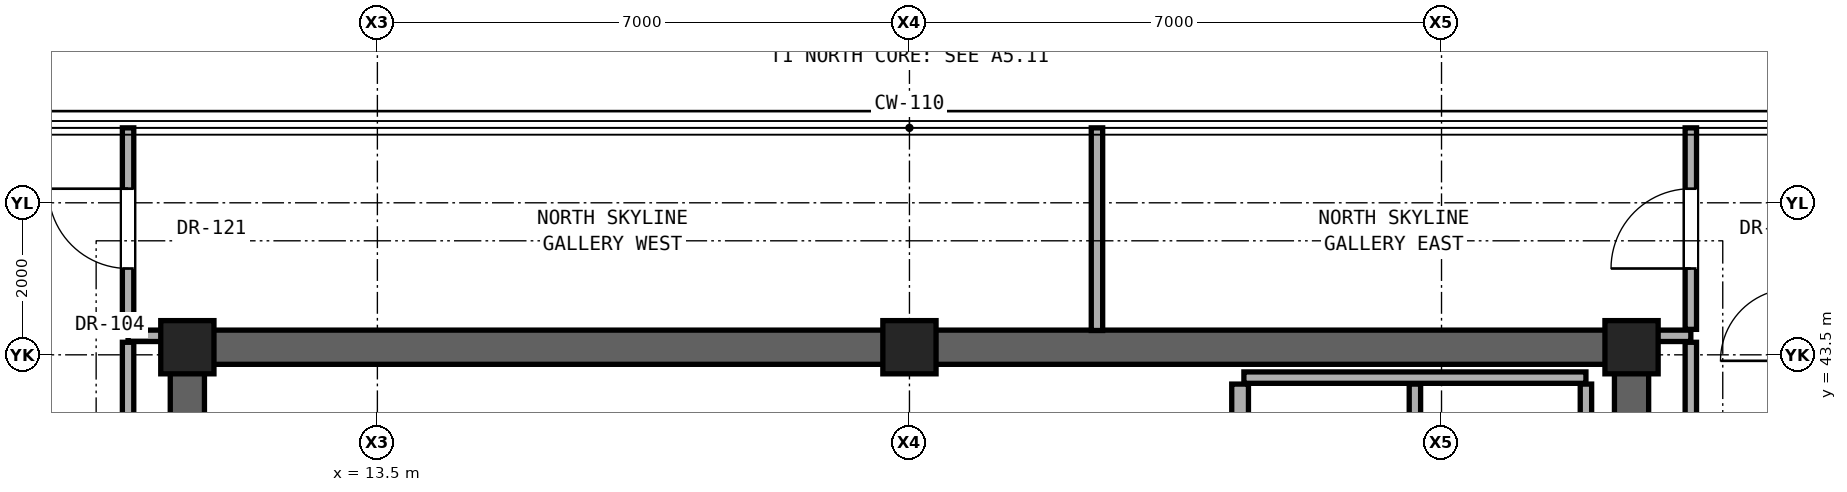
"""IFC4 building model, lengths in metres.
Left out: names, types, materials, properties, quantities, classifications, styles, units other than length and angle.
Written with IfcOpenShell. Run it as: python <this file> out.ifc"""

import sys

from ifc_helpers import new_model, si_unit, direction, frame, frame_2d, origin, origin_2d, place, context, subcontext, project, spatial, rectangle, extrude, element, fill, save


model = new_model("IFC4")
c1 = context("Model", 3, precision=1e-05, world=origin(), true_north=direction((0.0, 1.0)))
c2 = subcontext(c1, "Body", "Model", "MODEL_VIEW")
j1 = project(units=[si_unit("LENGTHUNIT", "METRE"), si_unit("PLANEANGLEUNIT", "RADIAN")], contexts=[c1])
p1 = place(None, origin())
s1 = spatial("IfcSite", under=j1, at=p1, CompositionType="ELEMENT")
p2 = place(p1, origin())
s2 = spatial("IfcBuilding", under=s1, at=p2, CompositionType="ELEMENT")
p3 = place(p2, frame((0.0, 0.0, 256.3)))
s3 = spatial("IfcBuildingStorey", under=s2, at=p3, CompositionType="ELEMENT", Elevation=256.3)
for number, where, z_axis, x_axis in (
    (1, (11.0, 43.6, 0.0), (0.0, 0.0, 1.0), (1.0, 0.0, 0.0)),
    (2, (20.5, 43.6, 0.0), (0.0, 0.0, 1.0), (1.0, 0.0, 0.0)),
    (3, (30.0, 43.6, 0.0), (0.0, 0.0, 1.0), (1.0, 0.0, 0.0)),
):
    element("IfcColumn", number, at=place(p3, frame(where, z_axis=z_axis, x_axis=x_axis)), inside=s3, PredefinedType="COLUMN", context=c2, shape_type="SweptSolid", body=[
        extrude(rectangle(XDim=0.7, YDim=0.7, at=origin_2d()), origin(), (0.0, 0.0, 1.0), 3.6),
    ])
p4 = place(p3, frame((11.0, 43.6, 0.0), z_axis=(0.0, 0.0, 1.0), x_axis=(1.0, 0.0, 0.0)))
e4 = element("IfcWall", 4, at=p4, inside=s3, PredefinedType="SHEAR", context=c2, shape_type="SweptSolid", body=[
    extrude(rectangle(XDim=19.0, YDim=0.45, at=frame_2d((9.5, 0.0))), origin(), (0.0, 0.0, 1.0), 3.4),
])
for number, where, z_axis, x_axis in (
    (5, (11.0, 37.6, 0.0), (0.0, 0.0, 1.0), (0.0, 1.0, 0.0)),
    (6, (30.0, 37.6, 0.0), (0.0, 0.0, 1.0), (0.0, 1.0, 0.0)),
):
    element("IfcWall", number, at=place(p3, frame(where, z_axis=z_axis, x_axis=x_axis)), inside=s3, PredefinedType="SHEAR", context=c2, shape_type="SweptSolid", body=[
        extrude(rectangle(XDim=6.0, YDim=0.45, at=frame_2d((3.0, 0.0))), origin(), (0.0, 0.0, 1.0), 3.4),
    ])
p5 = place(p3, frame((24.9, 43.2, 0.0), z_axis=(0.0, 0.0, 1.0), x_axis=(1.0, 0.0, 0.0)))
e7 = element("IfcWall", 7, at=p5, inside=s3, PredefinedType="PARTITIONING", context=c2, shape_type="SweptSolid", body=[
    extrude(rectangle(XDim=4.5, YDim=0.15, at=frame_2d((2.25, 0.0))), origin(), (0.0, 0.0, 1.0), 3.4),
])
for number, where, z_axis, x_axis in (
    (8, (10.22, 43.75, 0.0), (0.0, 0.0, 1.0), (1.0, 0.0, 0.0)),
    (9, (30.22, 43.75, 0.0), (0.0, 0.0, 1.0), (1.0, 0.0, 0.0)),
):
    element("IfcWall", number, at=place(p3, frame(where, z_axis=z_axis, x_axis=x_axis)), inside=s3, PredefinedType="PARTITIONING", context=c2, shape_type="SweptSolid", body=[
        extrude(rectangle(XDim=0.56, YDim=0.15, at=frame_2d((0.28, 0.0))), origin(), (0.0, 0.0, 1.0), 3.4),
    ])
p6 = place(p3, frame((10.22, 34.535, 0.0), z_axis=(0.0, 0.0, 1.0), x_axis=(0.0, 1.0, 0.0)))
e10 = element("IfcWall", 10, at=p6, inside=s3, PredefinedType="PARTITIONING", context=c2, shape_type="SweptSolid", body=[
    extrude(rectangle(XDim=9.13, YDim=0.15, at=frame_2d((4.565, 0.0))), origin(), (0.0, 0.0, 1.0), 2.792),
])
p7 = place(p3, frame((10.22, 43.835, 0.0), z_axis=(0.0, 0.0, 1.0), x_axis=(0.0, 1.0, 0.0)))
e11 = element("IfcWall", 11, at=p7, inside=s3, PredefinedType="PARTITIONING", context=c2, shape_type="SweptSolid", body=[
    extrude(rectangle(XDim=2.651, YDim=0.15, at=frame_2d((1.326, 0.0))), origin(), (0.0, 0.0, 1.0), 3.4),
])
p8 = place(p7, frame((0.801, 0.0, 0.0)))
e12 = element("IfcOpeningElement", 12, at=p8, cuts=e11, PredefinedType="OPENING", context=c2, shape_type="SweptSolid", body=[
    extrude(rectangle(XDim=1.05, YDim=2.2, at=frame_2d((0.525, 1.1))), frame((0.0, 0.085, 0.0), z_axis=(0.0, -1.0, 0.0), x_axis=(1.0, 0.0, 0.0)), (0.0, 0.0, 1.0), 0.17),
])
p9 = place(p3, frame((22.967, 43.82, 0.0), z_axis=(0.0, 0.0, 1.0), x_axis=(0.0, 1.0, 0.0)))
e13 = element("IfcWall", 13, at=p9, inside=s3, PredefinedType="PARTITIONING", context=c2, shape_type="SweptSolid", body=[
    extrude(rectangle(XDim=2.666, YDim=0.15, at=frame_2d((1.333, 0.0))), origin(), (0.0, 0.0, 1.0), 3.4),
])
p10 = place(p3, frame((24.85, 40.26, 0.0), z_axis=(0.0, 0.0, 1.0), x_axis=(0.0, 1.0, 0.0)))
e14 = element("IfcWall", 14, at=p10, inside=s3, PredefinedType="SOLIDWALL", context=c2, shape_type="SweptSolid", body=[
    extrude(rectangle(XDim=2.855, YDim=0.22, at=frame_2d((1.427, 0.0))), origin(), (0.0, 0.0, 1.0), 3.4),
])
for number, where, z_axis, x_axis in (
    (15, (27.15, 37.82, 0.0), (0.0, 0.0, 1.0), (0.0, 1.0, 0.0)),
    (16, (29.4, 37.82, 0.0), (0.0, 0.0, 1.0), (0.0, 1.0, 0.0)),
):
    element("IfcWall", number, at=place(p3, frame(where, z_axis=z_axis, x_axis=x_axis)), inside=s3, PredefinedType="PARTITIONING", context=c2, shape_type="SweptSolid", body=[
        extrude(rectangle(XDim=5.295, YDim=0.15, at=frame_2d((2.647, 0.0))), origin(), (0.0, 0.0, 1.0), 3.4),
    ])
p11 = place(p3, frame((30.78, 34.57, 0.0), z_axis=(0.0, 0.0, 1.0), x_axis=(0.0, 1.0, 0.0)))
e17 = element("IfcWall", 17, at=p11, inside=s3, PredefinedType="PARTITIONING", context=c2, shape_type="SweptSolid", body=[
    extrude(rectangle(XDim=9.095, YDim=0.15, at=frame_2d((4.547, 0.0))), origin(), (0.0, 0.0, 1.0), 2.792),
])
p12 = place(p3, frame((30.78, 43.835, 0.0), z_axis=(0.0, 0.0, 1.0), x_axis=(0.0, 1.0, 0.0)))
e18 = element("IfcWall", 18, at=p12, inside=s3, PredefinedType="PARTITIONING", context=c2, shape_type="SweptSolid", body=[
    extrude(rectangle(XDim=2.651, YDim=0.15, at=frame_2d((1.326, 0.0))), origin(), (0.0, 0.0, 1.0), 3.4),
])
p13 = place(p12, frame((0.801, 0.0, 0.0)))
e19 = element("IfcOpeningElement", 19, at=p13, cuts=e18, PredefinedType="OPENING", context=c2, shape_type="SweptSolid", body=[
    extrude(rectangle(XDim=1.05, YDim=2.2, at=frame_2d((0.525, 1.1))), frame((0.0, 0.085, 0.0), z_axis=(0.0, -1.0, 0.0), x_axis=(1.0, 0.0, 0.0)), (0.0, 0.0, 1.0), 0.17),
])
p14 = place(p8, origin())
e20 = element("IfcDoor", 20, at=p14, inside=s3, OperationType="SINGLE_SWING_RIGHT", PredefinedType="DOOR", context=c2, shape_type="SweptSolid", body=[
    extrude(rectangle(XDim=1.05, YDim=2.2, at=frame_2d((0.525, 1.1))), frame((0.0, 0.025, 0.0), z_axis=(0.0, -1.0, 0.0), x_axis=(1.0, 0.0, 0.0)), (0.0, 0.0, 1.0), 0.05),
])
fill(e12, e20)
p15 = place(p13, origin())
e21 = element("IfcDoor", 21, at=p15, inside=s3, OperationType="SINGLE_SWING_LEFT", PredefinedType="DOOR", context=c2, shape_type="SweptSolid", body=[
    extrude(rectangle(XDim=1.05, YDim=2.2, at=frame_2d((0.525, 1.1))), frame((0.0, 0.025, 0.0), z_axis=(0.0, -1.0, 0.0), x_axis=(1.0, 0.0, 0.0)), (0.0, 0.0, 1.0), 0.05),
])
fill(e19, e21)
save(model, sys.argv[1])
